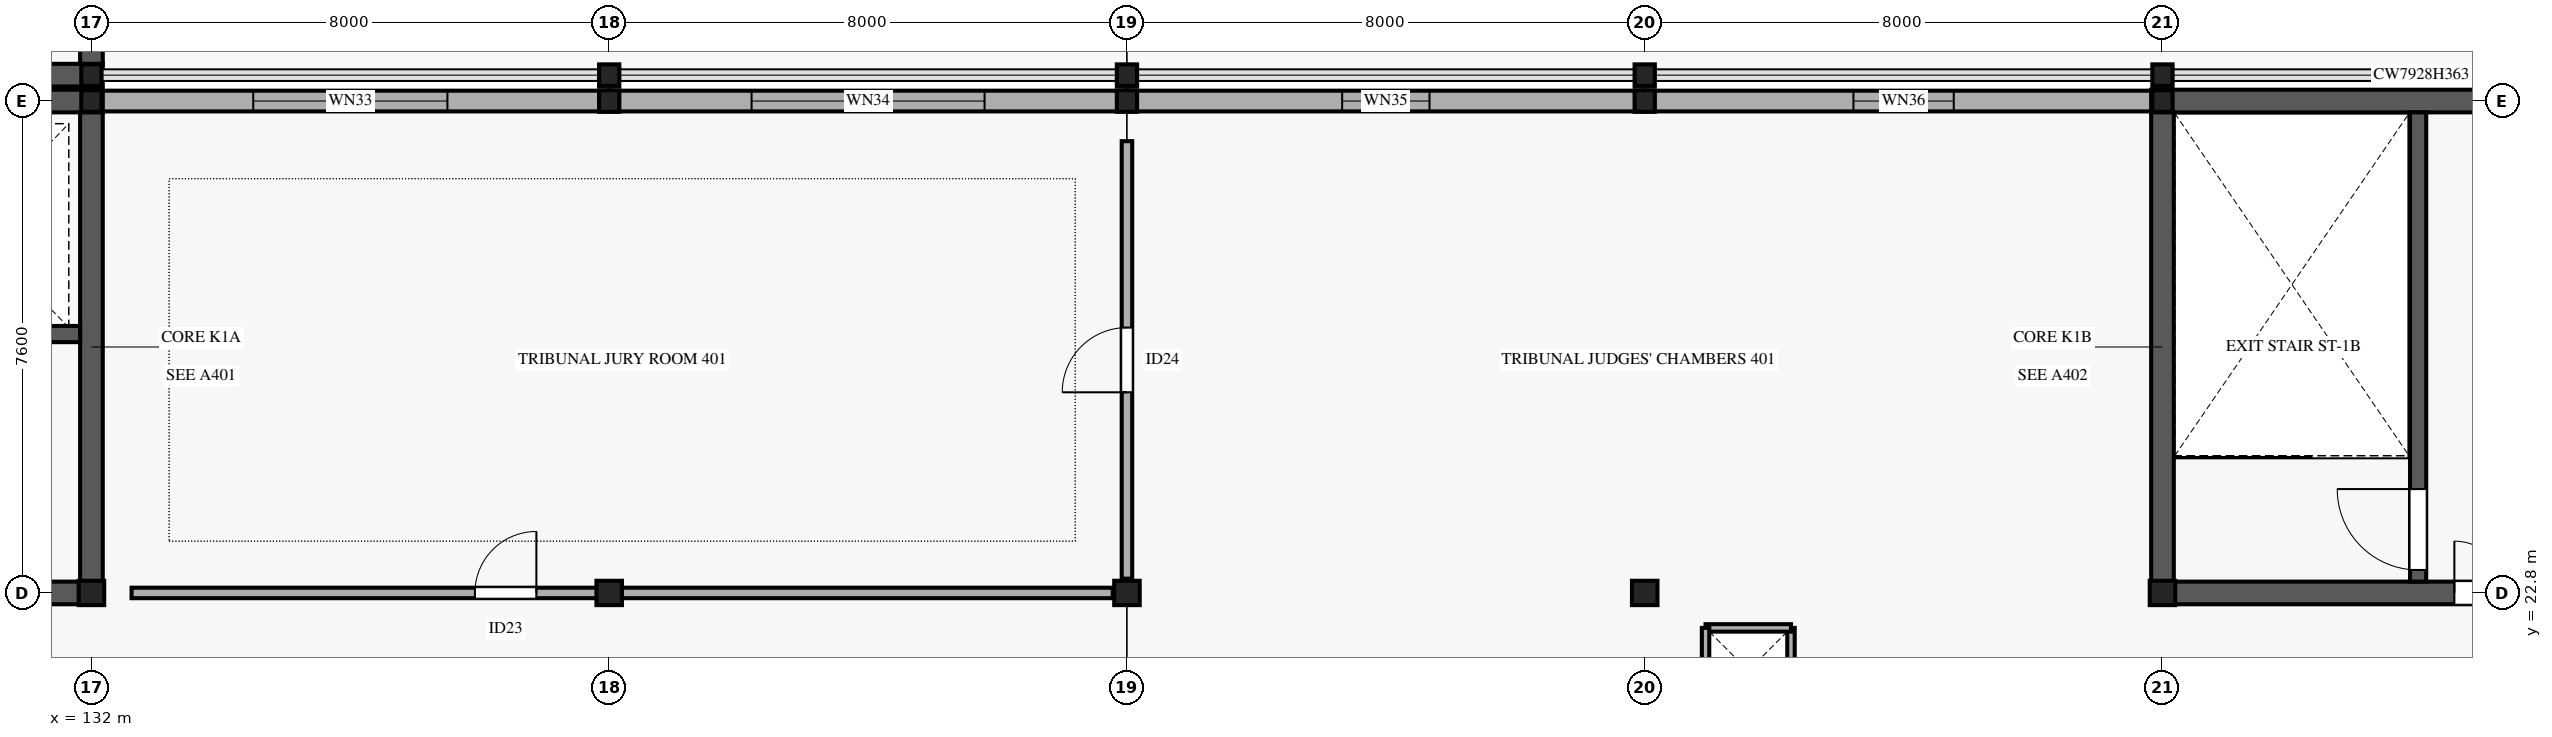
"""IFC4 building model, lengths in metres.
Left out: names, types, materials, properties, quantities, classifications, styles, units other than length and angle.
Written with IfcOpenShell. Run it as: python <this file> out.ifc"""

import sys

from ifc_helpers import new_model, si_unit, direction, frame, frame_2d, origin, origin_2d, place, context, subcontext, project, spatial, rectangle, i_section, extrude, element, fill, save


model = new_model("IFC4")
c1 = context("Model", 3, precision=1e-05, world=origin(), true_north=direction((0.0, 1.0)))
c2 = subcontext(c1, "Body", "Model", "MODEL_VIEW")
j1 = project(units=[si_unit("LENGTHUNIT", "METRE"), si_unit("PLANEANGLEUNIT", "RADIAN")], contexts=[c1])
p1 = place(None, origin())
s1 = spatial("IfcSite", under=j1, at=p1, CompositionType="ELEMENT")
p2 = place(p1, origin())
s2 = spatial("IfcBuilding", under=s1, at=p2, CompositionType="ELEMENT")
p3 = place(p2, frame((0.0, 0.0, 15.6)))
s3 = spatial("IfcBuildingStorey", under=s2, at=p3, CompositionType="ELEMENT", Elevation=15.6)
p4 = place(p3, frame((132.0, 22.8, 0.0), z_axis=(0.0, 0.0, 1.0), x_axis=(1.0, 0.0, 0.0)))
e1 = element("IfcColumn", 1, at=p4, inside=s3, PredefinedType="COLUMN", context=c2, shape_type="SweptSolid", body=[
    extrude(i_section(OverallWidth=0.394, OverallDepth=0.376, WebThickness=0.017, FlangeThickness=0.028, FilletRadius=0.015, at=origin_2d()), origin(), (0.0, 0.0, 1.0), 4.595),
])
p5 = place(p3, frame((132.0, 30.4, 0.0), z_axis=(0.0, 0.0, 1.0), x_axis=(1.0, 0.0, 0.0)))
e2 = element("IfcColumn", 2, at=p5, inside=s3, PredefinedType="COLUMN", context=c2, shape_type="SweptSolid", body=[
    extrude(i_section(OverallWidth=0.313, OverallDepth=0.333, WebThickness=0.018, FlangeThickness=0.028, FilletRadius=0.015, at=origin_2d()), origin(), (0.0, 0.0, 1.0), 4.595),
])
p6 = place(p3, frame((140.0, 22.8, 0.0), z_axis=(0.0, 0.0, 1.0), x_axis=(1.0, 0.0, 0.0)))
e3 = element("IfcColumn", 3, at=p6, inside=s3, PredefinedType="COLUMN", context=c2, shape_type="SweptSolid", body=[
    extrude(i_section(OverallWidth=0.394, OverallDepth=0.376, WebThickness=0.017, FlangeThickness=0.028, FilletRadius=0.015, at=origin_2d()), origin(), (0.0, 0.0, 1.0), 4.595),
])
p7 = place(p3, frame((140.0, 30.4, 0.0), z_axis=(0.0, 0.0, 1.0), x_axis=(1.0, 0.0, 0.0)))
e4 = element("IfcColumn", 4, at=p7, inside=s3, PredefinedType="COLUMN", context=c2, shape_type="SweptSolid", body=[
    extrude(i_section(OverallWidth=0.313, OverallDepth=0.333, WebThickness=0.018, FlangeThickness=0.028, FilletRadius=0.015, at=origin_2d()), origin(), (0.0, 0.0, 1.0), 4.595),
])
p8 = place(p3, frame((148.0, 22.8, 0.0), z_axis=(0.0, 0.0, 1.0), x_axis=(1.0, 0.0, 0.0)))
e5 = element("IfcColumn", 5, at=p8, inside=s3, PredefinedType="COLUMN", context=c2, shape_type="SweptSolid", body=[
    extrude(i_section(OverallWidth=0.394, OverallDepth=0.376, WebThickness=0.017, FlangeThickness=0.028, FilletRadius=0.015, at=origin_2d()), origin(), (0.0, 0.0, 1.0), 4.595),
])
p9 = place(p3, frame((148.0, 30.4, 0.0), z_axis=(0.0, 0.0, 1.0), x_axis=(1.0, 0.0, 0.0)))
e6 = element("IfcColumn", 6, at=p9, inside=s3, PredefinedType="COLUMN", context=c2, shape_type="SweptSolid", body=[
    extrude(i_section(OverallWidth=0.313, OverallDepth=0.333, WebThickness=0.018, FlangeThickness=0.028, FilletRadius=0.015, at=origin_2d()), origin(), (0.0, 0.0, 1.0), 4.595),
])
p10 = place(p3, frame((156.0, 22.8, 0.0), z_axis=(0.0, 0.0, 1.0), x_axis=(1.0, 0.0, 0.0)))
e7 = element("IfcColumn", 7, at=p10, inside=s3, PredefinedType="COLUMN", context=c2, shape_type="SweptSolid", body=[
    extrude(i_section(OverallWidth=0.394, OverallDepth=0.376, WebThickness=0.017, FlangeThickness=0.028, FilletRadius=0.015, at=origin_2d()), origin(), (0.0, 0.0, 1.0), 4.595),
])
p11 = place(p3, frame((156.0, 30.4, 0.0), z_axis=(0.0, 0.0, 1.0), x_axis=(1.0, 0.0, 0.0)))
e8 = element("IfcColumn", 8, at=p11, inside=s3, PredefinedType="COLUMN", context=c2, shape_type="SweptSolid", body=[
    extrude(i_section(OverallWidth=0.313, OverallDepth=0.333, WebThickness=0.018, FlangeThickness=0.028, FilletRadius=0.015, at=origin_2d()), origin(), (0.0, 0.0, 1.0), 4.595),
])
p12 = place(p3, frame((164.0, 22.8, 0.0), z_axis=(0.0, 0.0, 1.0), x_axis=(1.0, 0.0, 0.0)))
e9 = element("IfcColumn", 9, at=p12, inside=s3, PredefinedType="COLUMN", context=c2, shape_type="SweptSolid", body=[
    extrude(i_section(OverallWidth=0.394, OverallDepth=0.376, WebThickness=0.017, FlangeThickness=0.028, FilletRadius=0.015, at=origin_2d()), origin(), (0.0, 0.0, 1.0), 4.595),
])
p13 = place(p3, frame((164.0, 30.4, 0.0), z_axis=(0.0, 0.0, 1.0), x_axis=(1.0, 0.0, 0.0)))
e10 = element("IfcColumn", 10, at=p13, inside=s3, PredefinedType="COLUMN", context=c2, shape_type="SweptSolid", body=[
    extrude(i_section(OverallWidth=0.313, OverallDepth=0.333, WebThickness=0.018, FlangeThickness=0.028, FilletRadius=0.015, at=origin_2d()), origin(), (0.0, 0.0, 1.0), 4.595),
])
for number, where, z_axis, x_axis in (
    (11, (132.0, 30.8, 0.0), (0.0, 0.0, 1.0), (1.0, 0.0, 0.0)),
    (12, (140.0, 30.8, 0.0), (0.0, 0.0, 1.0), (1.0, 0.0, 0.0)),
    (13, (148.0, 30.8, 0.0), (0.0, 0.0, 1.0), (1.0, 0.0, 0.0)),
    (14, (156.0, 30.8, 0.0), (0.0, 0.0, 1.0), (1.0, 0.0, 0.0)),
    (15, (164.0, 30.8, 0.0), (0.0, 0.0, 1.0), (1.0, 0.0, 0.0)),
):
    element("IfcColumn", number, at=place(p3, frame(where, z_axis=z_axis, x_axis=x_axis)), inside=s3, PredefinedType="COLUMN", context=c2, shape_type="SweptSolid", body=[
        extrude(i_section(OverallWidth=0.313, OverallDepth=0.333, WebThickness=0.018, FlangeThickness=0.028, FilletRadius=0.015, at=origin_2d()), origin(), (0.0, 0.0, 1.0), 4.545),
    ])
p14 = place(p3, frame((131.98, 30.4, 0.0), z_axis=(0.0, 0.0, 1.0), x_axis=(1.0, 0.0, 0.0)))
e16 = element("IfcWall", 16, at=p14, inside=s3, PredefinedType="STANDARD", context=c2, shape_type="SweptSolid", body=[
    extrude(rectangle(XDim=8.04, YDim=0.32, at=frame_2d((4.02, 0.0))), origin(), (0.0, 0.0, 1.0), 3.66),
])
p15 = place(p14, frame((2.52, 0.0, 0.75)))
e17 = element("IfcOpeningElement", 17, at=p15, cuts=e16, PredefinedType="OPENING", context=c2, shape_type="SweptSolid", body=[
    extrude(rectangle(XDim=3.0, YDim=1.3, at=frame_2d((1.5, 0.65))), frame((0.0, 0.17, 0.0), z_axis=(0.0, -1.0, 0.0), x_axis=(1.0, 0.0, 0.0)), (0.0, 0.0, 1.0), 0.34),
])
p16 = place(p3, frame((139.98, 30.4, 0.0), z_axis=(0.0, 0.0, 1.0), x_axis=(1.0, 0.0, 0.0)))
e18 = element("IfcWall", 18, at=p16, inside=s3, PredefinedType="STANDARD", context=c2, shape_type="SweptSolid", body=[
    extrude(rectangle(XDim=8.04, YDim=0.32, at=frame_2d((4.02, 0.0))), origin(), (0.0, 0.0, 1.0), 3.66),
])
p17 = place(p16, frame((2.22, 0.0, 0.75)))
e19 = element("IfcOpeningElement", 19, at=p17, cuts=e18, PredefinedType="OPENING", context=c2, shape_type="SweptSolid", body=[
    extrude(rectangle(XDim=3.6, YDim=1.3, at=frame_2d((1.8, 0.65))), frame((0.0, 0.17, 0.0), z_axis=(0.0, -1.0, 0.0), x_axis=(1.0, 0.0, 0.0)), (0.0, 0.0, 1.0), 0.34),
])
p18 = place(p3, frame((147.98, 30.4, 0.0), z_axis=(0.0, 0.0, 1.0), x_axis=(1.0, 0.0, 0.0)))
e20 = element("IfcWall", 20, at=p18, inside=s3, PredefinedType="STANDARD", context=c2, shape_type="SweptSolid", body=[
    extrude(rectangle(XDim=8.04, YDim=0.32, at=frame_2d((4.02, 0.0))), origin(), (0.0, 0.0, 1.0), 3.66),
])
p19 = place(p18, frame((3.345, 0.0, 0.75)))
e21 = element("IfcOpeningElement", 21, at=p19, cuts=e20, PredefinedType="OPENING", context=c2, shape_type="SweptSolid", body=[
    extrude(rectangle(XDim=1.35, YDim=1.9, at=frame_2d((0.675, 0.95))), frame((0.0, 0.17, 0.0), z_axis=(0.0, -1.0, 0.0), x_axis=(1.0, 0.0, 0.0)), (0.0, 0.0, 1.0), 0.34),
])
p20 = place(p3, frame((155.98, 30.4, 0.0), z_axis=(0.0, 0.0, 1.0), x_axis=(1.0, 0.0, 0.0)))
e22 = element("IfcWall", 22, at=p20, inside=s3, PredefinedType="STANDARD", context=c2, shape_type="SweptSolid", body=[
    extrude(rectangle(XDim=8.04, YDim=0.32, at=frame_2d((4.02, 0.0))), origin(), (0.0, 0.0, 1.0), 3.66),
])
p21 = place(p20, frame((3.245, 0.0, 0.75)))
e23 = element("IfcOpeningElement", 23, at=p21, cuts=e22, PredefinedType="OPENING", context=c2, shape_type="SweptSolid", body=[
    extrude(rectangle(XDim=1.55, YDim=1.9, at=frame_2d((0.775, 0.95))), frame((0.0, 0.17, 0.0), z_axis=(0.0, -1.0, 0.0), x_axis=(1.0, 0.0, 0.0)), (0.0, 0.0, 1.0), 0.34),
])
for number, where, z_axis, x_axis in (
    (24, (158.26, 20.94, 0.0), (0.0, 0.0, 1.0), (0.0, 1.0, 0.0)),
    (25, (158.26, 22.26, 0.0), (0.0, 0.0, 1.0), (-1.0, 0.0, 0.0)),
    (26, (156.94, 22.26, 0.0), (0.0, 0.0, 1.0), (0.0, -1.0, 0.0)),
):
    element("IfcWall", number, at=place(p3, frame(where, z_axis=z_axis, x_axis=x_axis)), inside=s3, PredefinedType="PARTITIONING", context=c2, shape_type="SweptSolid", body=[
        extrude(rectangle(XDim=1.32, YDim=0.115, at=frame_2d((0.66, 0.0))), origin(), (0.0, 0.0, 1.0), 3.75),
    ])
p22 = place(p3, frame((124.225, 22.8, 0.0), z_axis=(0.0, 0.0, 1.0), x_axis=(1.0, 0.0, 0.0)))
e27 = element("IfcWall", 27, at=p22, inside=s3, PredefinedType="SHEAR", context=c2, shape_type="SweptSolid", body=[
    extrude(rectangle(XDim=7.95, YDim=0.35, at=frame_2d((3.975, 0.0))), origin(), (0.0, 0.0, 1.0), 4.59),
])
p23 = place(p22, frame((4.685, 0.0, 0.0)))
e28 = element("IfcOpeningElement", 28, at=p23, cuts=e27, PredefinedType="OPENING", context=c2, shape_type="SweptSolid", body=[
    extrude(rectangle(XDim=1.6, YDim=2.35, at=frame_2d((0.8, 1.175))), frame((0.0, 0.185, 0.0), z_axis=(0.0, -1.0, 0.0), x_axis=(1.0, 0.0, 0.0)), (0.0, 0.0, 1.0), 0.37),
])
p24 = place(p3, frame((124.225, 30.4, 0.0), z_axis=(0.0, 0.0, 1.0), x_axis=(1.0, 0.0, 0.0)))
e29 = element("IfcWall", 29, at=p24, inside=s3, PredefinedType="SHEAR", context=c2, shape_type="SweptSolid", body=[
    extrude(rectangle(XDim=7.95, YDim=0.35, at=frame_2d((3.975, 0.0))), origin(), (0.0, 0.0, 1.0), 4.59),
])
p25 = place(p3, frame((132.0, 22.975, 0.0), z_axis=(0.0, 0.0, 1.0), x_axis=(0.0, 1.0, 0.0)))
e30 = element("IfcWall", 30, at=p25, inside=s3, PredefinedType="SHEAR", context=c2, shape_type="SweptSolid", body=[
    extrude(rectangle(XDim=7.25, YDim=0.35, at=frame_2d((3.625, 0.0))), origin(), (0.0, 0.0, 1.0), 4.59),
])
p26 = place(p3, frame((128.475, 26.8, 0.0), z_axis=(0.0, 0.0, 1.0), x_axis=(1.0, 0.0, 0.0)))
e31 = element("IfcWall", 31, at=p26, inside=s3, PredefinedType="SHEAR", context=c2, shape_type="SweptSolid", body=[
    extrude(rectangle(XDim=3.35, YDim=0.25, at=frame_2d((1.675, 0.0))), origin(), (0.0, 0.0, 1.0), 4.59),
])
p27 = place(p26, frame((1.12, 0.0, 0.0)))
e32 = element("IfcOpeningElement", 32, at=p27, cuts=e31, PredefinedType="OPENING", context=c2, shape_type="SweptSolid", body=[
    extrude(rectangle(XDim=1.1, YDim=2.2, at=frame_2d((0.55, 1.1))), frame((0.0, 0.135, 0.0), z_axis=(0.0, -1.0, 0.0), x_axis=(1.0, 0.0, 0.0)), (0.0, 0.0, 1.0), 0.27),
])
p28 = place(p3, frame((163.825, 22.8, 0.0), z_axis=(0.0, 0.0, 1.0), x_axis=(1.0, 0.0, 0.0)))
e33 = element("IfcWall", 33, at=p28, inside=s3, PredefinedType="SHEAR", context=c2, shape_type="SweptSolid", body=[
    extrude(rectangle(XDim=8.35, YDim=0.35, at=frame_2d((4.175, 0.0))), origin(), (0.0, 0.0, 1.0), 4.59),
])
p29 = place(p28, frame((4.685, 0.0, 0.0)))
e34 = element("IfcOpeningElement", 34, at=p29, cuts=e33, PredefinedType="OPENING", context=c2, shape_type="SweptSolid", body=[
    extrude(rectangle(XDim=1.6, YDim=2.35, at=frame_2d((0.8, 1.175))), frame((0.0, 0.185, 0.0), z_axis=(0.0, -1.0, 0.0), x_axis=(1.0, 0.0, 0.0)), (0.0, 0.0, 1.0), 0.37),
])
p30 = place(p3, frame((163.825, 30.4, 0.0), z_axis=(0.0, 0.0, 1.0), x_axis=(1.0, 0.0, 0.0)))
e35 = element("IfcWall", 35, at=p30, inside=s3, PredefinedType="SHEAR", context=c2, shape_type="SweptSolid", body=[
    extrude(rectangle(XDim=8.35, YDim=0.35, at=frame_2d((4.175, 0.0))), origin(), (0.0, 0.0, 1.0), 4.59),
])
p31 = place(p3, frame((164.0, 22.975, 0.0), z_axis=(0.0, 0.0, 1.0), x_axis=(0.0, 1.0, 0.0)))
e36 = element("IfcWall", 36, at=p31, inside=s3, PredefinedType="SHEAR", context=c2, shape_type="SweptSolid", body=[
    extrude(rectangle(XDim=7.25, YDim=0.35, at=frame_2d((3.625, 0.0))), origin(), (0.0, 0.0, 1.0), 4.59),
])
p32 = place(p3, frame((167.95, 22.975, 0.0), z_axis=(0.0, 0.0, 1.0), x_axis=(0.0, 1.0, 0.0)))
e37 = element("IfcWall", 37, at=p32, inside=s3, PredefinedType="SHEAR", context=c2, shape_type="SweptSolid", body=[
    extrude(rectangle(XDim=7.25, YDim=0.25, at=frame_2d((3.625, 0.0))), origin(), (0.0, 0.0, 1.0), 4.59),
])
p33 = place(p32, frame((0.18, 0.0, 0.0)))
e38 = element("IfcOpeningElement", 38, at=p33, cuts=e37, PredefinedType="OPENING", context=c2, shape_type="SweptSolid", body=[
    extrude(rectangle(XDim=1.25, YDim=2.2, at=frame_2d((0.625, 1.1))), frame((0.0, 0.135, 0.0), z_axis=(0.0, -1.0, 0.0), x_axis=(1.0, 0.0, 0.0)), (0.0, 0.0, 1.0), 0.27),
])
p34 = place(p3, frame((124.225, 30.8, 0.0), z_axis=(0.0, 0.0, 1.0), x_axis=(1.0, 0.0, 0.0)))
e39 = element("IfcWall", 39, at=p34, inside=s3, PredefinedType="SHEAR", context=c2, shape_type="SweptSolid", body=[
    extrude(rectangle(XDim=7.95, YDim=0.35, at=frame_2d((3.975, 0.0))), origin(), (0.0, 0.0, 1.0), 4.545),
])
p35 = place(p3, frame((132.0, 30.975, 0.0), z_axis=(0.0, 0.0, 1.0), x_axis=(0.0, 1.0, 0.0)))
e40 = element("IfcWall", 40, at=p35, inside=s3, PredefinedType="SHEAR", context=c2, shape_type="SweptSolid", body=[
    extrude(rectangle(XDim=6.85, YDim=0.35, at=frame_2d((3.425, 0.0))), origin(), (0.0, 0.0, 1.0), 4.545),
])
p36 = place(p35, frame((1.15, 0.0, 0.0)))
e41 = element("IfcOpeningElement", 41, at=p36, cuts=e40, PredefinedType="OPENING", context=c2, shape_type="SweptSolid", body=[
    extrude(rectangle(XDim=1.6, YDim=2.35, at=frame_2d((0.8, 1.175))), frame((0.0, 0.185, 0.0), z_axis=(0.0, -1.0, 0.0), x_axis=(1.0, 0.0, 0.0)), (0.0, 0.0, 1.0), 0.37),
])
p37 = place(p3, frame((132.62, 22.8, 0.0), z_axis=(0.0, 0.0, 1.0), x_axis=(1.0, 0.0, 0.0)))
e42 = element("IfcWall", 42, at=p37, inside=s3, PredefinedType="PARTITIONING", context=c2, shape_type="SweptSolid", body=[
    extrude(rectangle(XDim=15.16, YDim=0.162, at=frame_2d((7.58, 0.0))), origin(), (0.0, 0.0, 1.0), 3.45),
])
p38 = place(p37, frame((5.305, 0.0, 0.0)))
e43 = element("IfcOpeningElement", 43, at=p38, cuts=e42, PredefinedType="OPENING", context=c2, shape_type="SweptSolid", body=[
    extrude(rectangle(XDim=0.95, YDim=2.15, at=frame_2d((0.475, 1.075))), frame((0.0, 0.091, 0.0), z_axis=(0.0, -1.0, 0.0), x_axis=(1.0, 0.0, 0.0)), (0.0, 0.0, 1.0), 0.182),
])
p39 = place(p3, frame((148.0, 23.02, 0.0), z_axis=(0.0, 0.0, 1.0), x_axis=(0.0, 1.0, 0.0)))
e44 = element("IfcWall", 44, at=p39, inside=s3, PredefinedType="PARTITIONING", context=c2, shape_type="SweptSolid", body=[
    extrude(rectangle(XDim=6.76, YDim=0.162, at=frame_2d((3.38, 0.0))), origin(), (0.0, 0.0, 1.0), 3.45),
])
p40 = place(p39, frame((2.88, 0.0, 0.0)))
e45 = element("IfcOpeningElement", 45, at=p40, cuts=e44, PredefinedType="OPENING", context=c2, shape_type="SweptSolid", body=[
    extrude(rectangle(XDim=1.0, YDim=2.15, at=frame_2d((0.5, 1.075))), frame((0.0, 0.091, 0.0), z_axis=(0.0, -1.0, 0.0), x_axis=(1.0, 0.0, 0.0)), (0.0, 0.0, 1.0), 0.182),
])
p41 = place(p15, origin())
e46 = element("IfcWindow", 46, at=p41, inside=s3, PartitioningType="SINGLE_PANEL", PredefinedType="WINDOW", context=c2, shape_type="SweptSolid", body=[
    extrude(rectangle(XDim=3.0, YDim=1.3, at=frame_2d((1.5, 0.65))), frame((0.0, 0.03, 0.0), z_axis=(0.0, -1.0, 0.0), x_axis=(1.0, 0.0, 0.0)), (0.0, 0.0, 1.0), 0.06),
])
fill(e17, e46)
p42 = place(p17, origin())
e47 = element("IfcWindow", 47, at=p42, inside=s3, PartitioningType="SINGLE_PANEL", PredefinedType="WINDOW", context=c2, shape_type="SweptSolid", body=[
    extrude(rectangle(XDim=3.6, YDim=1.3, at=frame_2d((1.8, 0.65))), frame((0.0, 0.03, 0.0), z_axis=(0.0, -1.0, 0.0), x_axis=(1.0, 0.0, 0.0)), (0.0, 0.0, 1.0), 0.06),
])
fill(e19, e47)
p43 = place(p19, origin())
e48 = element("IfcWindow", 48, at=p43, inside=s3, PartitioningType="SINGLE_PANEL", PredefinedType="WINDOW", context=c2, shape_type="SweptSolid", body=[
    extrude(rectangle(XDim=1.35, YDim=1.9, at=frame_2d((0.675, 0.95))), frame((0.0, 0.03, 0.0), z_axis=(0.0, -1.0, 0.0), x_axis=(1.0, 0.0, 0.0)), (0.0, 0.0, 1.0), 0.06),
])
fill(e21, e48)
p44 = place(p21, origin())
e49 = element("IfcWindow", 49, at=p44, inside=s3, PartitioningType="SINGLE_PANEL", PredefinedType="WINDOW", context=c2, shape_type="SweptSolid", body=[
    extrude(rectangle(XDim=1.55, YDim=1.9, at=frame_2d((0.775, 0.95))), frame((0.0, 0.03, 0.0), z_axis=(0.0, -1.0, 0.0), x_axis=(1.0, 0.0, 0.0)), (0.0, 0.0, 1.0), 0.06),
])
fill(e23, e49)
p45 = place(p33, origin())
e50 = element("IfcDoor", 50, at=p45, inside=s3, OperationType="SINGLE_SWING_RIGHT", PredefinedType="DOOR", context=c2, shape_type="SweptSolid", body=[
    extrude(rectangle(XDim=1.25, YDim=2.2, at=frame_2d((0.625, 1.1))), frame((0.0, 0.025, 0.0), z_axis=(0.0, -1.0, 0.0), x_axis=(1.0, 0.0, 0.0)), (0.0, 0.0, 1.0), 0.05),
])
fill(e38, e50)
p46 = place(p29, origin())
e51 = element("IfcDoor", 51, at=p46, inside=s3, OperationType="DOUBLE_DOOR_SINGLE_SWING", PredefinedType="DOOR", context=c2, shape_type="SweptSolid", body=[
    extrude(rectangle(XDim=1.6, YDim=2.35, at=frame_2d((0.8, 1.175))), frame((0.0, 0.025, 0.0), z_axis=(0.0, -1.0, 0.0), x_axis=(1.0, 0.0, 0.0)), (0.0, 0.0, 1.0), 0.05),
])
fill(e34, e51)
p47 = place(p38, origin())
e52 = element("IfcDoor", 52, at=p47, inside=s3, OperationType="SINGLE_SWING_RIGHT", PredefinedType="DOOR", context=c2, shape_type="SweptSolid", body=[
    extrude(rectangle(XDim=0.95, YDim=2.15, at=frame_2d((0.475, 1.075))), frame((0.0, 0.025, 0.0), z_axis=(0.0, -1.0, 0.0), x_axis=(1.0, 0.0, 0.0)), (0.0, 0.0, 1.0), 0.05),
])
fill(e43, e52)
p48 = place(p40, origin())
e53 = element("IfcDoor", 53, at=p48, inside=s3, OperationType="SINGLE_SWING_LEFT", PredefinedType="DOOR", context=c2, shape_type="SweptSolid", body=[
    extrude(rectangle(XDim=1.0, YDim=2.15, at=frame_2d((0.5, 1.075))), frame((0.0, 0.025, 0.0), z_axis=(0.0, -1.0, 0.0), x_axis=(1.0, 0.0, 0.0)), (0.0, 0.0, 1.0), 0.05),
])
fill(e45, e53)
save(model, sys.argv[1])
